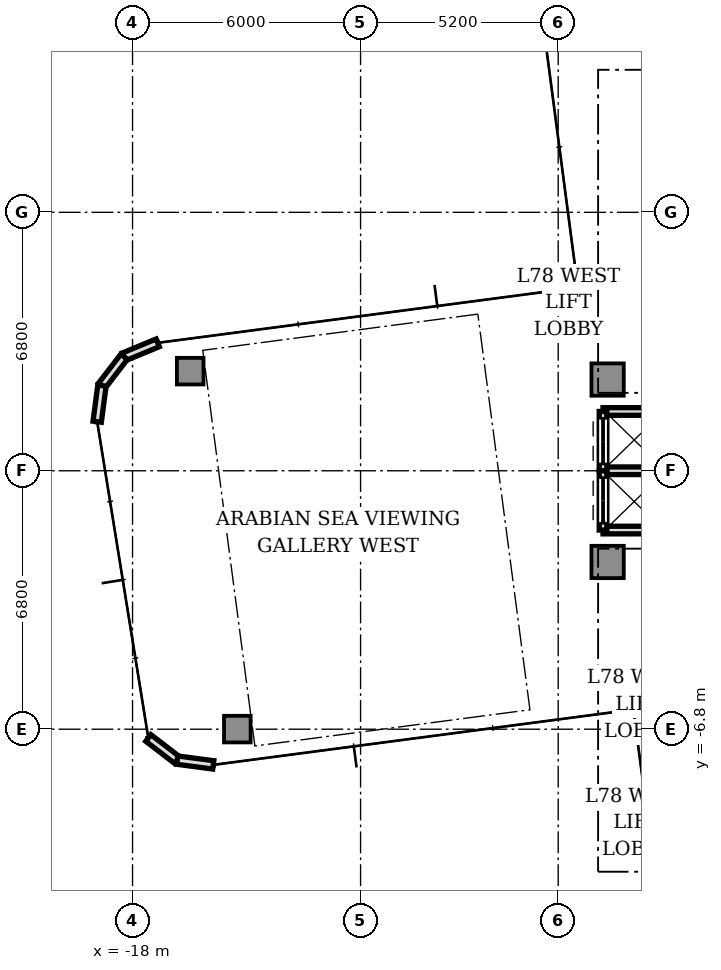
"""IFC4 building model, lengths in metres.
Left out: names, types, materials, properties, quantities, classifications, styles, units other than length and angle.
Written with IfcOpenShell. Run it as: python <this file> out.ifc"""

import sys

from ifc_helpers import new_model, si_unit, direction, frame, frame_2d, origin, origin_2d, place, context, subcontext, project, spatial, rectangle, extrude, source, transform, mapped, element, fill, save


model = new_model("IFC4")
c1 = context("Model", 3, precision=1e-05, world=origin(), true_north=direction((0.0, 1.0)))
c2 = subcontext(c1, "Body", "Model", "MODEL_VIEW")
j1 = project(units=[si_unit("LENGTHUNIT", "METRE"), si_unit("PLANEANGLEUNIT", "RADIAN")], contexts=[c1])
p1 = place(None, origin())
s1 = spatial("IfcSite", under=j1, at=p1, CompositionType="ELEMENT")
p2 = place(p1, origin())
s2 = spatial("IfcBuilding", under=s1, at=p2, CompositionType="ELEMENT")
p3 = place(p2, frame((0.0, 0.0, 280.3)))
s3 = spatial("IfcBuildingStorey", under=s2, at=p3, CompositionType="ELEMENT", Elevation=280.3)
m1 = source(origin(), c2, "Body", "SweptSolid", [
    extrude(rectangle(XDim=0.85, YDim=0.85, at=origin_2d()), origin(), (0.0, 0.0, 1.0), 4.5),
])
for number, where, z_axis, x_axis in (
    (1, (-5.5, 2.4, 0.0), (0.0, 0.0, 1.0), (1.0, 0.0, 0.0)),
    (2, (-5.5, -2.4, 0.0), (0.0, 0.0, 1.0), (1.0, 0.0, 0.0)),
):
    element("IfcColumn", number, at=place(p3, frame(where, z_axis=z_axis, x_axis=x_axis)), inside=s3, PredefinedType="COLUMN", context=c2, shape_type="MappedRepresentation", body=[
        mapped(m1, transform((0.0, 0.0, 0.0), scale=1.0)),
    ])
m2 = source(origin(), c2, "Body", "SweptSolid", [
    extrude(rectangle(XDim=0.7, YDim=0.7, at=origin_2d()), origin(), (0.0, 0.0, 1.0), 4.5),
])
for number, where, z_axis, x_axis in (
    (3, (-16.483, 2.621, 0.0), (0.0, 0.0, 1.0), (1.0, 0.0, 0.0)),
    (4, (-15.243, -6.798, 0.0), (0.0, 0.0, 1.0), (1.0, 0.0, 0.0)),
):
    element("IfcColumn", number, at=place(p3, frame(where, z_axis=z_axis, x_axis=x_axis)), inside=s3, PredefinedType="COLUMN", context=c2, shape_type="MappedRepresentation", body=[
        mapped(m2, transform((0.0, 0.0, 0.0), scale=1.0)),
    ])
for number, where, z_axis, x_axis in (
    (5, (-17.338, 3.366, 0.0), (0.0, 0.0, 1.0), (-0.924, -0.383, 0.0)),
    (6, (-18.222, 2.999, 0.0), (0.0, 0.0, 1.0), (-0.609, -0.793, 0.0)),
    (7, (-18.805, 2.24, 0.0), (0.0, 0.0, 1.0), (-0.131, -0.991, 0.0)),
):
    element("IfcWall", number, at=place(p3, frame(where, z_axis=z_axis, x_axis=x_axis)), inside=s3, PredefinedType="STANDARD", context=c2, shape_type="SweptSolid", body=[
        extrude(rectangle(XDim=0.958, YDim=0.22, at=frame_2d((0.479, 0.0))), origin(), (0.0, 0.0, 1.0), 4.5),
    ])
p4 = place(p3, frame((-17.585, -7.031, 0.0), z_axis=(0.0, 0.0, 1.0), x_axis=(0.793466811674, -0.60861352168, 0.0)))
e8 = element("IfcWall", 8, at=p4, inside=s3, PredefinedType="STANDARD", context=c2, shape_type="SweptSolid", body=[
    extrude(rectangle(XDim=0.958, YDim=0.22, at=frame_2d((0.479, 0.0))), origin(), (0.0, 0.0, 1.0), 4.5),
])
p5 = place(p3, frame((-16.825, -7.613, 0.0), z_axis=(0.0, 0.0, 1.0), x_axis=(0.991444747987, -0.130527053476, 0.0)))
e9 = element("IfcWall", 9, at=p5, inside=s3, PredefinedType="STANDARD", context=c2, shape_type="SweptSolid", body=[
    extrude(rectangle(XDim=0.958, YDim=0.22, at=frame_2d((0.479, 0.0))), origin(), (0.0, 0.0, 1.0), 4.5),
])
for number, where, z_axis, x_axis in (
    (10, (-5.62, 1.56, 0.0), (0.0, 0.0, 1.0), (1.0, 0.0, 0.0)),
    (11, (-5.62, -1.56, 0.0), (0.0, 0.0, 1.0), (1.0, 0.0, 0.0)),
    (12, (-5.62, 0.0, 0.0), (0.0, 0.0, 1.0), (1.0, 0.0, 0.0)),
):
    element("IfcWall", number, at=place(p3, frame(where, z_axis=z_axis, x_axis=x_axis)), inside=s3, PredefinedType="SOLIDWALL", context=c2, shape_type="SweptSolid", body=[
        extrude(rectangle(XDim=1.64, YDim=0.2, at=frame_2d((0.82, 0.0))), origin(), (0.0, 0.0, 1.0), 4.05),
    ])
p6 = place(p3, frame((-5.62, 0.0, 0.0), z_axis=(0.0, 0.0, 1.0), x_axis=(0.0, 1.0, 0.0)))
e13 = element("IfcWall", 13, at=p6, inside=s3, PredefinedType="SOLIDWALL", context=c2, shape_type="SweptSolid", body=[
    extrude(rectangle(XDim=1.56, YDim=0.2, at=frame_2d((0.78, 0.0))), origin(), (0.0, 0.0, 1.0), 4.05),
])
p7 = place(p6, frame((0.18, 0.0, 0.0)))
e14 = element("IfcOpeningElement", 14, at=p7, cuts=e13, PredefinedType="OPENING", context=c2, shape_type="SweptSolid", body=[
    extrude(rectangle(XDim=1.2, YDim=2.2, at=frame_2d((0.6, 1.1))), frame((0.0, 0.11, 0.0), z_axis=(0.0, -1.0, 0.0), x_axis=(1.0, 0.0, 0.0)), (0.0, 0.0, 1.0), 0.22),
])
p8 = place(p3, frame((-5.62, -1.56, 0.0), z_axis=(0.0, 0.0, 1.0), x_axis=(0.0, 1.0, 0.0)))
e15 = element("IfcWall", 15, at=p8, inside=s3, PredefinedType="SOLIDWALL", context=c2, shape_type="SweptSolid", body=[
    extrude(rectangle(XDim=1.56, YDim=0.2, at=frame_2d((0.78, 0.0))), origin(), (0.0, 0.0, 1.0), 4.05),
])
p9 = place(p8, frame((0.18, 0.0, 0.0)))
e16 = element("IfcOpeningElement", 16, at=p9, cuts=e15, PredefinedType="OPENING", context=c2, shape_type="SweptSolid", body=[
    extrude(rectangle(XDim=1.2, YDim=2.2, at=frame_2d((0.6, 1.1))), frame((0.0, 0.11, 0.0), z_axis=(0.0, -1.0, 0.0), x_axis=(1.0, 0.0, 0.0)), (0.0, 0.0, 1.0), 0.22),
])
m3 = source(origin(), c2, "Body", "SweptSolid", [
    extrude(rectangle(XDim=1.2, YDim=0.05, at=origin_2d()), origin(), (0.0, 0.0, 1.0), 2.2),
])
p10 = place(p7, frame((0.6, 0.0, 0.0)))
e17 = element("IfcDoor", 17, at=p10, inside=s3, OperationType="DOUBLE_DOOR_SLIDING", PredefinedType="DOOR", context=c2, shape_type="MappedRepresentation", body=[
    mapped(m3, transform((0.0, 0.0, 0.0), scale=1.0)),
])
fill(e14, e17)
p11 = place(p9, frame((0.6, 0.0, 0.0)))
e18 = element("IfcDoor", 18, at=p11, inside=s3, OperationType="DOUBLE_DOOR_SLIDING", PredefinedType="DOOR", context=c2, shape_type="MappedRepresentation", body=[
    mapped(m3, transform((0.0, 0.0, 0.0), scale=1.0)),
])
fill(e16, e18)
save(model, sys.argv[1])
